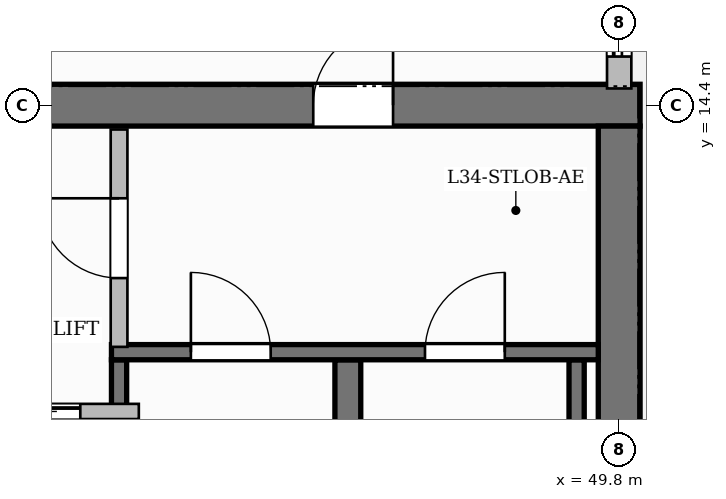
"""IFC4 building model, lengths in metres.
Left out: names, types, materials, properties, quantities, classifications, styles, units other than length and angle.
Written with IfcOpenShell. Run it as: python <this file> out.ifc"""

import sys

from ifc_helpers import new_model, si_unit, direction, frame, frame_2d, origin, place, context, subcontext, project, spatial, rectangle, extrude, source, transform, mapped, element, fill, save


model = new_model("IFC4")
c1 = context("Model", 3, precision=1e-05, world=origin(), true_north=direction((0.0, 1.0)))
c2 = subcontext(c1, "Body", "Model", "MODEL_VIEW")
j1 = project(units=[si_unit("LENGTHUNIT", "METRE"), si_unit("PLANEANGLEUNIT", "RADIAN")], contexts=[c1])
p1 = place(None, origin())
s1 = spatial("IfcSite", under=j1, at=p1, CompositionType="ELEMENT")
p2 = place(p1, origin())
s2 = spatial("IfcBuilding", under=s1, at=p2, CompositionType="ELEMENT")
p3 = place(p2, frame((0.0, 0.0, 137.7)))
s3 = spatial("IfcBuildingStorey", under=s2, at=p3, CompositionType="ELEMENT", Elevation=137.7)
p4 = place(p3, frame((34.525, 14.4, 0.0), z_axis=(0.0, 0.0, 1.0), x_axis=(1.0, 0.0, 0.0)))
e1 = element("IfcWall", 1, at=p4, inside=s3, PredefinedType="SHEAR", context=c2, shape_type="SweptSolid", body=[
    extrude(rectangle(XDim=15.55, YDim=0.55, at=frame_2d((7.775, 0.0))), origin(), (0.0, 0.0, 1.0), 3.7),
])
p5 = place(p4, frame((5.405, 0.0, 0.0)))
e2 = element("IfcOpeningElement", 2, at=p5, cuts=e1, PredefinedType="OPENING", context=c2, shape_type="SweptSolid", body=[
    extrude(rectangle(XDim=1.5, YDim=2.2, at=frame_2d((0.75, 1.1))), frame((0.0, 0.285, 0.0), z_axis=(0.0, -1.0, 0.0), x_axis=(1.0, 0.0, 0.0)), (0.0, 0.0, 1.0), 0.57),
])
p6 = place(p4, frame((1.62, 0.0, 0.0)))
e3 = element("IfcOpeningElement", 3, at=p6, cuts=e1, PredefinedType="OPENING", context=c2, shape_type="SweptSolid", body=[
    extrude(rectangle(XDim=1.05, YDim=2.15, at=frame_2d((0.525, 1.075))), frame((0.0, 0.285, 0.0), z_axis=(0.0, -1.0, 0.0), x_axis=(1.0, 0.0, 0.0)), (0.0, 0.0, 1.0), 0.57),
])
p7 = place(p4, frame((11.25, 0.0, 0.0)))
e4 = element("IfcOpeningElement", 4, at=p7, cuts=e1, PredefinedType="OPENING", context=c2, shape_type="SweptSolid", body=[
    extrude(rectangle(XDim=1.05, YDim=2.15, at=frame_2d((0.525, 1.075))), frame((0.0, 0.285, 0.0), z_axis=(0.0, -1.0, 0.0), x_axis=(1.0, 0.0, 0.0)), (0.0, 0.0, 1.0), 0.57),
])
p8 = place(p3, frame((49.8, 3.875, 0.0), z_axis=(0.0, 0.0, 1.0), x_axis=(0.0, 1.0, 0.0)))
e5 = element("IfcWall", 5, at=p8, inside=s3, PredefinedType="SHEAR", context=c2, shape_type="SweptSolid", body=[
    extrude(rectangle(XDim=10.25, YDim=0.55, at=frame_2d((5.125, 0.0))), origin(), (0.0, 0.0, 1.0), 3.7),
])
p9 = place(p3, frame((43.22, 4.1, 0.0), z_axis=(0.0, 0.0, 1.0), x_axis=(0.0, 1.0, 0.0)))
e6 = element("IfcWall", 6, at=p9, inside=s3, PredefinedType="SHEAR", context=c2, shape_type="SweptSolid", body=[
    extrude(rectangle(XDim=6.95, YDim=0.2, at=frame_2d((3.475, 0.0))), origin(), (0.0, 0.0, 1.0), 3.7),
])
p10 = place(p3, frame((46.23, 4.1, 0.0), z_axis=(0.0, 0.0, 1.0), x_axis=(0.0, 1.0, 0.0)))
e7 = element("IfcWall", 7, at=p10, inside=s3, PredefinedType="SHEAR", context=c2, shape_type="SweptSolid", body=[
    extrude(rectangle(XDim=6.95, YDim=0.34, at=frame_2d((3.475, 0.0))), origin(), (0.0, 0.0, 1.0), 3.7),
])
p11 = place(p3, frame((49.24, 4.1, 0.0), z_axis=(0.0, 0.0, 1.0), x_axis=(0.0, 1.0, 0.0)))
e8 = element("IfcWall", 8, at=p11, inside=s3, PredefinedType="SHEAR", context=c2, shape_type="SweptSolid", body=[
    extrude(rectangle(XDim=6.95, YDim=0.2, at=frame_2d((3.475, 0.0))), origin(), (0.0, 0.0, 1.0), 3.7),
])
p12 = place(p3, frame((43.12, 11.15, 0.0), z_axis=(0.0, 0.0, 1.0), x_axis=(1.0, 0.0, 0.0)))
e9 = element("IfcWall", 9, at=p12, inside=s3, PredefinedType="SHEAR", context=c2, shape_type="SweptSolid", body=[
    extrude(rectangle(XDim=6.405, YDim=0.2, at=frame_2d((3.202, 0.0))), origin(), (0.0, 0.0, 1.0), 3.7),
])
p13 = place(p12, frame((1.045, 0.0, 0.0)))
e10 = element("IfcOpeningElement", 10, at=p13, cuts=e9, PredefinedType="OPENING", context=c2, shape_type="SweptSolid", body=[
    extrude(rectangle(XDim=1.05, YDim=2.2, at=frame_2d((0.525, 1.1))), frame((0.0, 0.11, 0.0), z_axis=(0.0, -1.0, 0.0), x_axis=(1.0, 0.0, 0.0)), (0.0, 0.0, 1.0), 0.22),
])
p14 = place(p12, frame((4.125, 0.0, 0.0)))
e11 = element("IfcOpeningElement", 11, at=p14, cuts=e9, PredefinedType="OPENING", context=c2, shape_type="SweptSolid", body=[
    extrude(rectangle(XDim=1.05, YDim=2.2, at=frame_2d((0.525, 1.1))), frame((0.0, 0.11, 0.0), z_axis=(0.0, -1.0, 0.0), x_axis=(1.0, 0.0, 0.0)), (0.0, 0.0, 1.0), 0.22),
])
p15 = place(p3, frame((43.22, 11.22, 0.0), z_axis=(0.0, 0.0, 1.0), x_axis=(0.0, 1.0, 0.0)))
e12 = element("IfcWall", 12, at=p15, inside=s3, PredefinedType="PARTITIONING", context=c2, shape_type="SweptSolid", body=[
    extrude(rectangle(XDim=2.86, YDim=0.22, at=frame_2d((1.43, 0.0))), origin(), (0.0, 0.0, 1.0), 3.45),
])
p16 = place(p15, frame((0.905, 0.0, 0.0)))
e13 = element("IfcOpeningElement", 13, at=p16, cuts=e12, PredefinedType="OPENING", context=c2, shape_type="SweptSolid", body=[
    extrude(rectangle(XDim=1.05, YDim=2.15, at=frame_2d((0.525, 1.075))), frame((0.0, 0.12, 0.0), z_axis=(0.0, -1.0, 0.0), x_axis=(1.0, 0.0, 0.0)), (0.0, 0.0, 1.0), 0.24),
])
p17 = place(p3, frame((40.84, 10.37, 0.0), z_axis=(0.0, 0.0, 1.0), x_axis=(1.0, 0.0, 0.0)))
e14 = element("IfcWall", 14, at=p17, inside=s3, PredefinedType="PARTITIONING", context=c2, shape_type="SweptSolid", body=[
    extrude(rectangle(XDim=2.64, YDim=0.2, at=frame_2d((1.32, 0.0))), origin(), (0.0, 0.0, 1.0), 3.45),
])
p18 = place(p17, frame((0.77, 0.0, 0.0)))
e15 = element("IfcOpeningElement", 15, at=p18, cuts=e14, PredefinedType="OPENING", context=c2, shape_type="SweptSolid", body=[
    extrude(rectangle(XDim=1.1, YDim=2.2, at=frame_2d((0.55, 1.1))), frame((0.0, 0.11, 0.0), z_axis=(0.0, -1.0, 0.0), x_axis=(1.0, 0.0, 0.0)), (0.0, 0.0, 1.0), 0.22),
])
p19 = place(p3, frame((49.8, 14.62, 0.0), z_axis=(0.0, 0.0, 1.0), x_axis=(0.0, 1.0, 0.0)))
e16 = element("IfcWall", 16, at=p19, inside=s3, PredefinedType="SOLIDWALL", context=c2, shape_type="SweptSolid", body=[
    extrude(rectangle(XDim=6.93, YDim=0.32, at=frame_2d((3.465, 0.0))), origin(), (0.0, 0.0, 1.0), 2.935),
])
p20 = place(p19, frame((0.42, 0.0, 0.0)))
e17 = element("IfcOpeningElement", 17, at=p20, cuts=e16, PredefinedType="OPENING", context=c2, shape_type="SweptSolid", body=[
    extrude(rectangle(XDim=1.2, YDim=2.2, at=frame_2d((0.6, 1.1))), frame((0.0, 0.17, 0.0), z_axis=(0.0, -1.0, 0.0), x_axis=(1.0, 0.0, 0.0)), (0.0, 0.0, 1.0), 0.34),
])
p21 = place(p19, frame((3.659, 0.0, 0.8)))
e18 = element("IfcOpeningElement", 18, at=p21, cuts=e16, PredefinedType="OPENING", context=c2, shape_type="SweptSolid", body=[
    extrude(rectangle(XDim=1.8, YDim=1.85, at=frame_2d((0.9, 0.925))), frame((0.0, 0.17, 0.0), z_axis=(0.0, -1.0, 0.0), x_axis=(1.0, 0.0, 0.0)), (0.0, 0.0, 1.0), 0.34),
])
m1 = source(origin(), c2, "Body", "SweptSolid", [
    extrude(rectangle(XDim=1.05, YDim=2.2, at=frame_2d((0.525, 1.1))), frame((0.0, 0.025, 0.0), z_axis=(0.0, -1.0, 0.0), x_axis=(1.0, 0.0, 0.0)), (0.0, 0.0, 1.0), 0.05),
])
p22 = place(p13, origin())
e19 = element("IfcDoor", 19, at=p22, inside=s3, OperationType="SINGLE_SWING_LEFT", PredefinedType="DOOR", context=c2, shape_type="MappedRepresentation", body=[
    mapped(m1, transform((0.0, 0.0, 0.0), scale=1.0)),
])
fill(e10, e19)
p23 = place(p14, origin())
e20 = element("IfcDoor", 20, at=p23, inside=s3, OperationType="SINGLE_SWING_RIGHT", PredefinedType="DOOR", context=c2, shape_type="MappedRepresentation", body=[
    mapped(m1, transform((0.0, 0.0, 0.0), scale=1.0)),
])
fill(e11, e20)
m2 = source(origin(), c2, "Body", "SweptSolid", [
    extrude(rectangle(XDim=1.05, YDim=2.15, at=frame_2d((0.525, 1.075))), frame((0.0, 0.025, 0.0), z_axis=(0.0, -1.0, 0.0), x_axis=(1.0, 0.0, 0.0)), (0.0, 0.0, 1.0), 0.05),
])
p24 = place(p16, origin())
e21 = element("IfcDoor", 21, at=p24, inside=s3, OperationType="SINGLE_SWING_RIGHT", PredefinedType="DOOR", context=c2, shape_type="MappedRepresentation", body=[
    mapped(m2, transform((0.0, 0.0, 0.0), scale=1.0)),
])
fill(e13, e21)
p25 = place(p7, origin())
e22 = element("IfcDoor", 22, at=p25, inside=s3, OperationType="SINGLE_SWING_RIGHT", PredefinedType="DOOR", context=c2, shape_type="MappedRepresentation", body=[
    mapped(m2, transform((0.0, 0.0, 0.0), scale=1.0)),
])
fill(e4, e22)
m3 = source(origin(), c2, "Body", "SweptSolid", [
    extrude(rectangle(XDim=1.1, YDim=2.2, at=frame_2d((0.55, 1.1))), frame((0.0, 0.025, 0.0), z_axis=(0.0, -1.0, 0.0), x_axis=(1.0, 0.0, 0.0)), (0.0, 0.0, 1.0), 0.05),
])
p26 = place(p18, origin())
e23 = element("IfcDoor", 23, at=p26, inside=s3, OperationType="SLIDING_TO_LEFT", PredefinedType="DOOR", context=c2, shape_type="MappedRepresentation", body=[
    mapped(m3, transform((0.0, 0.0, 0.0), scale=1.0)),
])
fill(e15, e23)
m4 = source(origin(), c2, "Body", "SweptSolid", [
    extrude(rectangle(XDim=1.2, YDim=2.2, at=frame_2d((0.6, 1.1))), frame((0.0, 0.025, 0.0), z_axis=(0.0, -1.0, 0.0), x_axis=(1.0, 0.0, 0.0)), (0.0, 0.0, 1.0), 0.05),
])
p27 = place(p20, origin())
e24 = element("IfcDoor", 24, at=p27, inside=s3, OperationType="SLIDING_TO_LEFT", PredefinedType="DOOR", context=c2, shape_type="MappedRepresentation", body=[
    mapped(m4, transform((0.0, 0.0, 0.0), scale=1.0)),
])
fill(e17, e24)
save(model, sys.argv[1])
